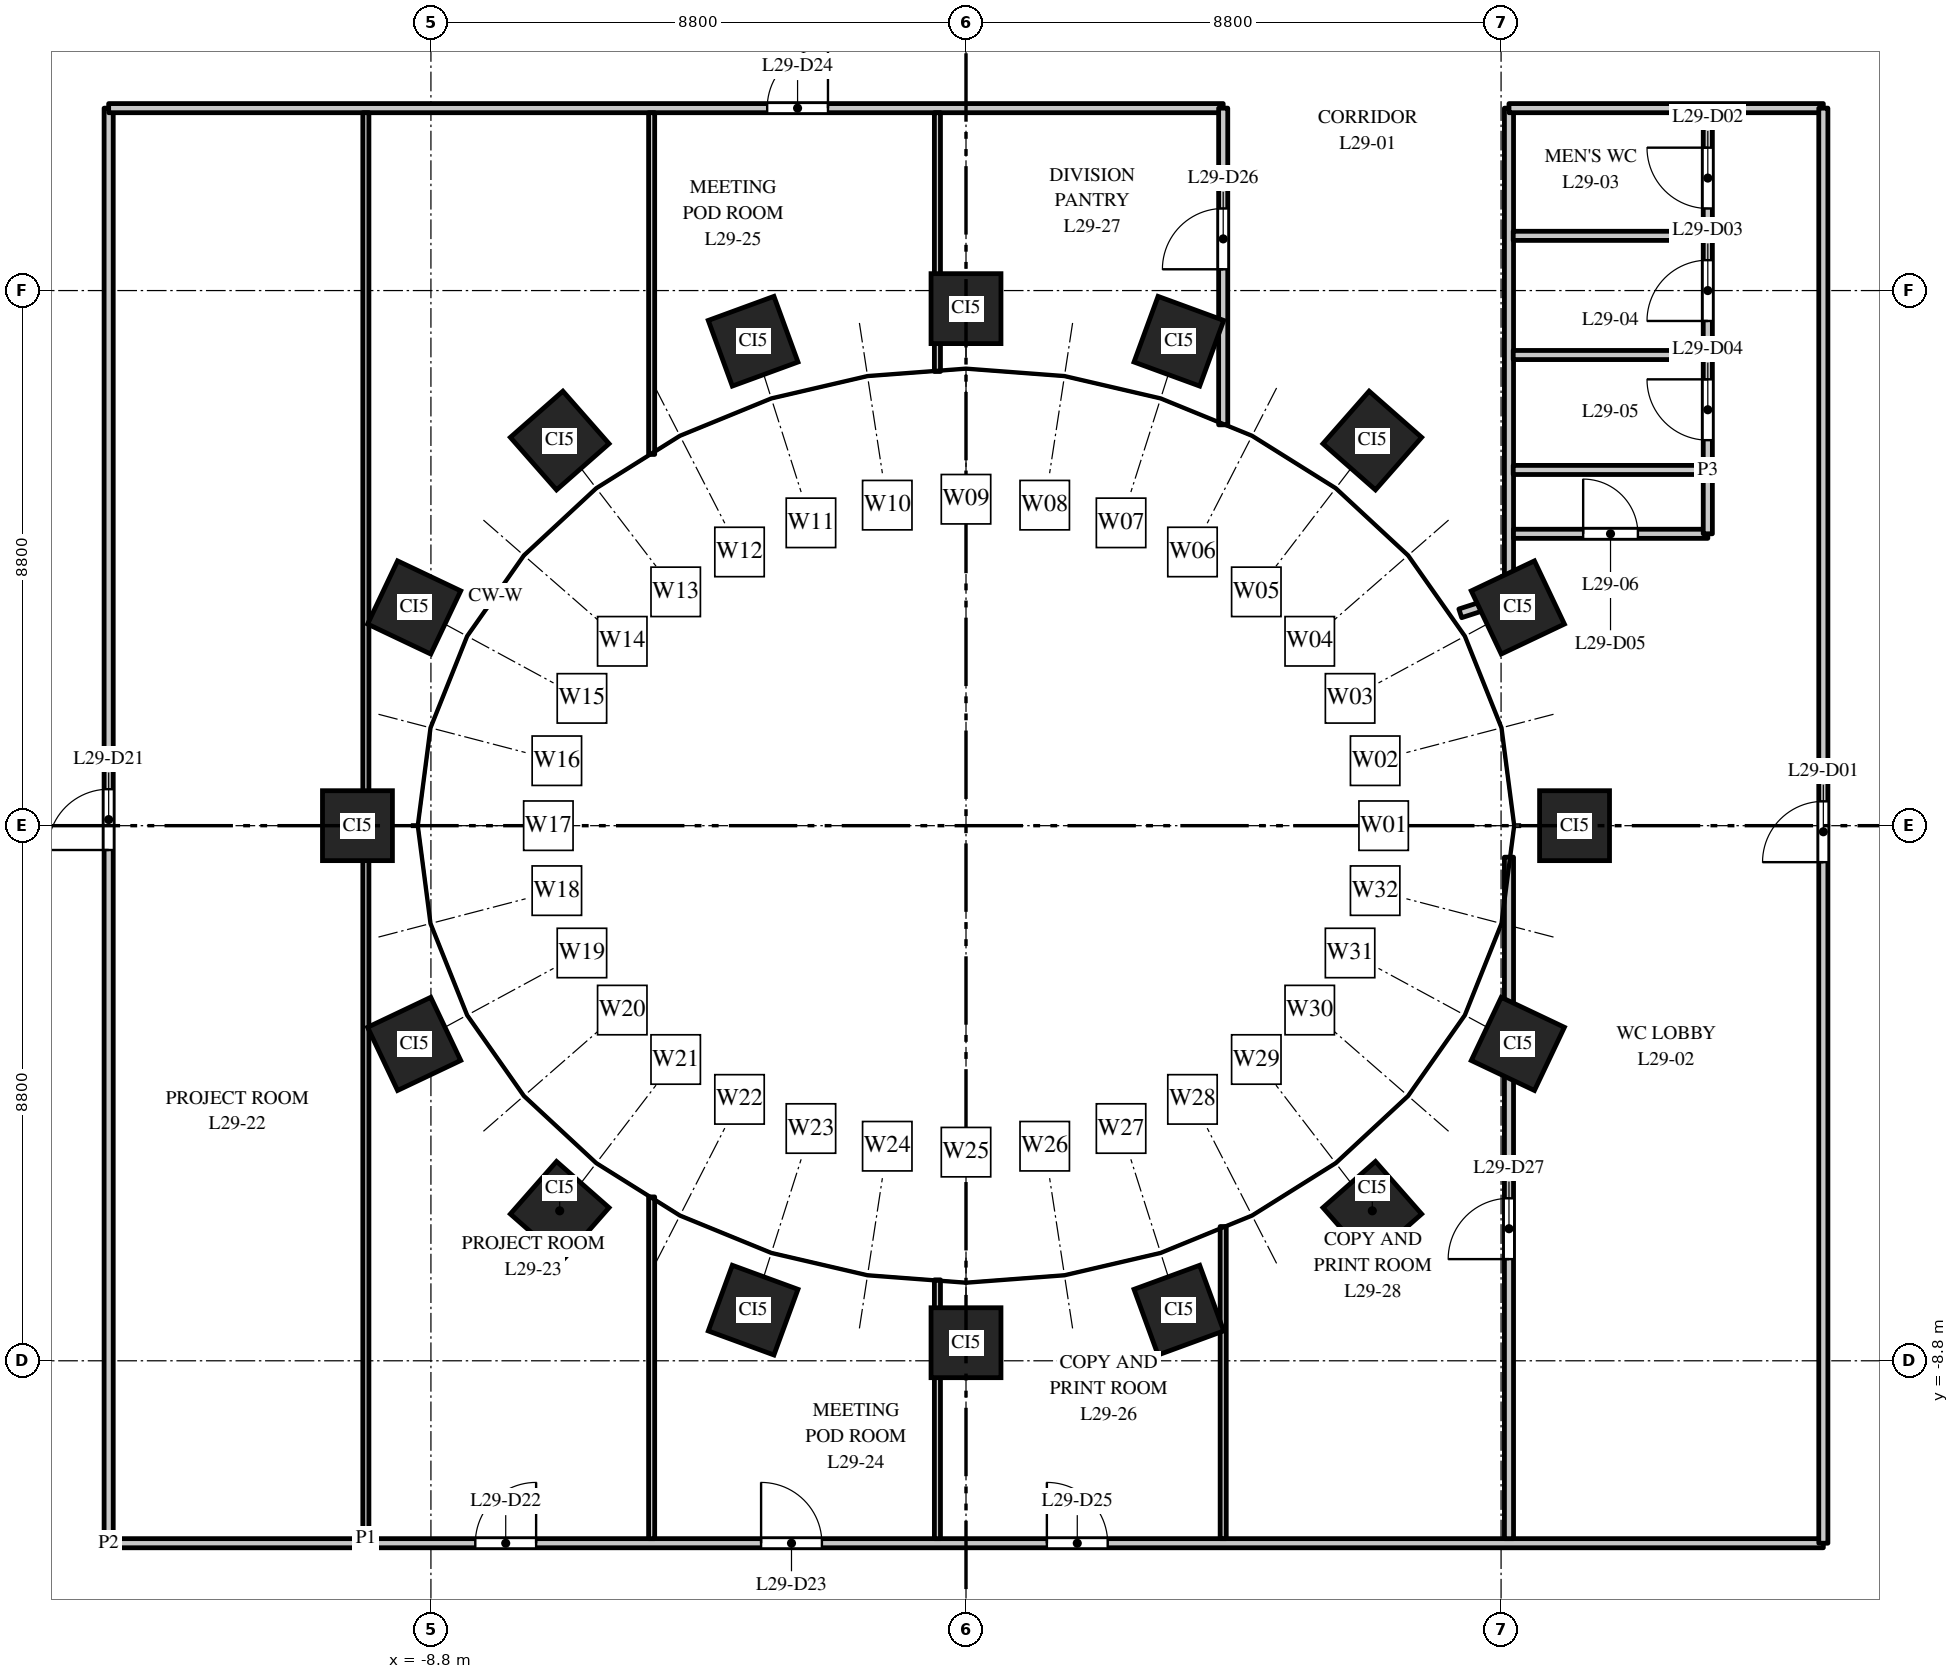
"""IFC4 building model, lengths in metres.
Left out: names, types, materials, properties, quantities, classifications, styles, units other than length and angle.
Written with IfcOpenShell. Run it as: python <this file> out.ifc"""

import sys

from ifc_helpers import new_model, si_unit, direction, frame, frame_2d, origin, origin_2d, place, context, subcontext, project, spatial, rectangle, extrude, element, fill, save


model = new_model("IFC4")
c1 = context("Model", 3, precision=1e-05, world=origin(), true_north=direction((0.0, 1.0)))
c2 = subcontext(c1, "Body", "Model", "MODEL_VIEW")
j1 = project(units=[si_unit("LENGTHUNIT", "METRE"), si_unit("PLANEANGLEUNIT", "RADIAN")], contexts=[c1])
p1 = place(None, origin())
s1 = spatial("IfcSite", under=j1, at=p1, CompositionType="ELEMENT")
p2 = place(p1, origin())
s2 = spatial("IfcBuilding", under=s1, at=p2, CompositionType="ELEMENT")
p3 = place(p2, frame((0.0, 0.0, 128.0)))
s3 = spatial("IfcBuildingStorey", under=s2, at=p3, CompositionType="ELEMENT", Elevation=128.0)
for number, where, z_axis, x_axis in (
    (1, (10.008, 0.0, 0.0), (0.0, 0.0, 1.0), (0.0, 1.0, 0.0)),
    (2, (9.076, 3.588, 0.0), (0.0, 0.0, 1.0), (-0.429, 0.903, 0.0)),
    (3, (6.682, 6.334, 0.0), (0.0, 0.0, 1.0), (-0.751, 0.66, 0.0)),
    (4, (3.501, 7.967, 0.0), (0.0, 0.0, 1.0), (-0.939, 0.344, 0.0)),
    (5, (0.0, 8.503, 0.0), (0.0, 0.0, 1.0), (-1.0, 0.0, 0.0)),
    (6, (-3.501, 7.967, 0.0), (0.0, 0.0, 1.0), (-0.939, -0.344, 0.0)),
    (7, (-6.682, 6.334, 0.0), (0.0, 0.0, 1.0), (-0.751, -0.66, 0.0)),
    (8, (-9.076, 3.588, 0.0), (0.0, 0.0, 1.0), (-0.429, -0.903, 0.0)),
    (9, (-10.008, 0.0, 0.0), (0.0, 0.0, 1.0), (0.0, -1.0, 0.0)),
    (10, (-9.076, -3.588, 0.0), (0.0, 0.0, 1.0), (0.429, -0.903, 0.0)),
    (11, (-6.682, -6.334, 0.0), (0.0, 0.0, 1.0), (0.751, -0.66, 0.0)),
    (12, (-3.501, -7.967, 0.0), (0.0, 0.0, 1.0), (0.939, -0.344, 0.0)),
    (13, (0.0, -8.503, 0.0), (0.0, 0.0, 1.0), (1.0, 0.0, 0.0)),
    (14, (3.501, -7.967, 0.0), (0.0, 0.0, 1.0), (0.939, 0.344, 0.0)),
    (15, (6.682, -6.334, 0.0), (0.0, 0.0, 1.0), (0.751, 0.66, 0.0)),
    (16, (9.076, -3.588, 0.0), (0.0, 0.0, 1.0), (0.429, 0.903, 0.0)),
):
    element("IfcColumn", number, at=place(p3, frame(where, z_axis=z_axis, x_axis=x_axis)), inside=s3, PredefinedType="COLUMN", context=c2, shape_type="SweptSolid", body=[
        extrude(rectangle(XDim=1.15, YDim=1.15, at=origin_2d()), origin(), (0.0, 0.0, 1.0), 4.0),
    ])
p4 = place(p3, frame((-14.1, -11.8, 0.0), z_axis=(0.0, 0.0, 1.0), x_axis=(0.0, 1.0, 0.0)))
e17 = element("IfcWall", 17, at=p4, inside=s3, PredefinedType="PARTITIONING", context=c2, shape_type="SweptSolid", body=[
    extrude(rectangle(XDim=23.6, YDim=0.15, at=frame_2d((11.8, 0.0))), origin(), (0.0, 0.0, 1.0), 2.75),
])
p5 = place(p4, frame((11.4, 0.0, 0.0)))
e18 = element("IfcOpeningElement", 18, at=p5, cuts=e17, PredefinedType="OPENING", context=c2, shape_type="SweptSolid", body=[
    extrude(rectangle(XDim=1.0, YDim=2.1, at=frame_2d((0.5, 1.05))), frame((0.0, 0.085, 0.0), z_axis=(0.0, -1.0, 0.0), x_axis=(1.0, 0.0, 0.0)), (0.0, 0.0, 1.0), 0.17),
])
p6 = place(p3, frame((-14.1, -11.8, 0.0), z_axis=(0.0, 0.0, 1.0), x_axis=(1.0, 0.0, 0.0)))
e19 = element("IfcWall", 19, at=p6, inside=s3, PredefinedType="PARTITIONING", context=c2, shape_type="SweptSolid", body=[
    extrude(rectangle(XDim=28.2, YDim=0.15, at=frame_2d((14.1, 0.0))), origin(), (0.0, 0.0, 1.0), 2.85),
])
p7 = place(p6, frame((6.03, 0.0, 0.0)))
e20 = element("IfcOpeningElement", 20, at=p7, cuts=e19, PredefinedType="OPENING", context=c2, shape_type="SweptSolid", body=[
    extrude(rectangle(XDim=1.0, YDim=2.1, at=frame_2d((0.5, 1.05))), frame((0.0, 0.085, 0.0), z_axis=(0.0, -1.0, 0.0), x_axis=(1.0, 0.0, 0.0)), (0.0, 0.0, 1.0), 0.17),
])
p8 = place(p6, frame((10.73, 0.0, 0.0)))
e21 = element("IfcOpeningElement", 21, at=p8, cuts=e19, PredefinedType="OPENING", context=c2, shape_type="SweptSolid", body=[
    extrude(rectangle(XDim=1.0, YDim=2.1, at=frame_2d((0.5, 1.05))), frame((0.0, 0.085, 0.0), z_axis=(0.0, -1.0, 0.0), x_axis=(1.0, 0.0, 0.0)), (0.0, 0.0, 1.0), 0.17),
])
p9 = place(p6, frame((15.43, 0.0, 0.0)))
e22 = element("IfcOpeningElement", 22, at=p9, cuts=e19, PredefinedType="OPENING", context=c2, shape_type="SweptSolid", body=[
    extrude(rectangle(XDim=1.0, YDim=2.1, at=frame_2d((0.5, 1.05))), frame((0.0, 0.085, 0.0), z_axis=(0.0, -1.0, 0.0), x_axis=(1.0, 0.0, 0.0)), (0.0, 0.0, 1.0), 0.17),
])
p10 = place(p3, frame((-14.1, 11.8, 0.0), z_axis=(0.0, 0.0, 1.0), x_axis=(1.0, 0.0, 0.0)))
e23 = element("IfcWall", 23, at=p10, inside=s3, PredefinedType="PARTITIONING", context=c2, shape_type="SweptSolid", body=[
    extrude(rectangle(XDim=18.33, YDim=0.15, at=frame_2d((9.165, 0.0))), origin(), (0.0, 0.0, 1.0), 2.85),
])
p11 = place(p10, frame((10.83, 0.0, 0.0)))
e24 = element("IfcOpeningElement", 24, at=p11, cuts=e23, PredefinedType="OPENING", context=c2, shape_type="SweptSolid", body=[
    extrude(rectangle(XDim=1.0, YDim=2.1, at=frame_2d((0.5, 1.05))), frame((0.0, 0.085, 0.0), z_axis=(0.0, -1.0, 0.0), x_axis=(1.0, 0.0, 0.0)), (0.0, 0.0, 1.0), 0.17),
])
p12 = place(p3, frame((-9.87, -11.725, 0.0), z_axis=(0.0, 0.0, 1.0), x_axis=(0.0, 1.0, 0.0)))
e25 = element("IfcWall", 25, at=p12, inside=s3, PredefinedType="PARTITIONING", context=c2, shape_type="SweptSolid", body=[
    extrude(rectangle(XDim=23.45, YDim=0.1, at=frame_2d((11.725, 0.0))), origin(), (0.0, 0.0, 1.0), 2.75),
])
for number, where, z_axis, x_axis in (
    (26, (-5.17, -11.725, 0.0), (0.0, 0.0, 1.0), (0.0, 1.0, 0.0)),
    (27, (-5.17, 6.105, 0.0), (0.0, 0.0, 1.0), (0.0, 1.0, 0.0)),
):
    element("IfcWall", number, at=place(p3, frame(where, z_axis=z_axis, x_axis=x_axis)), inside=s3, PredefinedType="PARTITIONING", context=c2, shape_type="SweptSolid", body=[
        extrude(rectangle(XDim=5.62, YDim=0.1, at=frame_2d((2.81, 0.0))), origin(), (0.0, 0.0, 1.0), 2.9),
    ])
for number, where, z_axis, x_axis in (
    (28, (-0.47, -11.725, 0.0), (0.0, 0.0, 1.0), (0.0, 1.0, 0.0)),
    (29, (-0.47, 7.469, 0.0), (0.0, 0.0, 1.0), (0.0, 1.0, 0.0)),
):
    element("IfcWall", number, at=place(p3, frame(where, z_axis=z_axis, x_axis=x_axis)), inside=s3, PredefinedType="PARTITIONING", context=c2, shape_type="SweptSolid", body=[
        extrude(rectangle(XDim=4.256, YDim=0.1, at=frame_2d((2.128, 0.0))), origin(), (0.0, 0.0, 1.0), 2.9),
    ])
p13 = place(p3, frame((4.23, -11.725, 0.0), z_axis=(0.0, 0.0, 1.0), x_axis=(0.0, 1.0, 0.0)))
e30 = element("IfcWall", 30, at=p13, inside=s3, PredefinedType="PARTITIONING", context=c2, shape_type="SweptSolid", body=[
    extrude(rectangle(XDim=5.133, YDim=0.1, at=frame_2d((2.566, 0.0))), origin(), (0.0, 0.0, 1.0), 2.9),
])
p14 = place(p3, frame((4.23, 6.592, 0.0), z_axis=(0.0, 0.0, 1.0), x_axis=(0.0, 1.0, 0.0)))
e31 = element("IfcWall", 31, at=p14, inside=s3, PredefinedType="PARTITIONING", context=c2, shape_type="SweptSolid", body=[
    extrude(rectangle(XDim=5.208, YDim=0.15, at=frame_2d((2.604, 0.0))), origin(), (0.0, 0.0, 1.0), 2.9),
])
p15 = place(p14, frame((2.558, 0.0, 0.0)))
e32 = element("IfcOpeningElement", 32, at=p15, cuts=e31, PredefinedType="OPENING", context=c2, shape_type="SweptSolid", body=[
    extrude(rectangle(XDim=1.0, YDim=2.1, at=frame_2d((0.5, 1.05))), frame((0.0, 0.085, 0.0), z_axis=(0.0, -1.0, 0.0), x_axis=(1.0, 0.0, 0.0)), (0.0, 0.0, 1.0), 0.17),
])
p16 = place(p3, frame((8.93, -11.725, 0.0), z_axis=(0.0, 0.0, 1.0), x_axis=(0.0, 1.0, 0.0)))
e33 = element("IfcWall", 33, at=p16, inside=s3, PredefinedType="PARTITIONING", context=c2, shape_type="SweptSolid", body=[
    extrude(rectangle(XDim=11.207, YDim=0.15, at=frame_2d((5.604, 0.0))), origin(), (0.0, 0.0, 1.0), 2.75),
])
p17 = place(p16, frame((4.597, 0.0, 0.0)))
e34 = element("IfcOpeningElement", 34, at=p17, cuts=e33, PredefinedType="OPENING", context=c2, shape_type="SweptSolid", body=[
    extrude(rectangle(XDim=1.0, YDim=2.1, at=frame_2d((0.5, 1.05))), frame((0.0, 0.085, 0.0), z_axis=(0.0, -1.0, 0.0), x_axis=(1.0, 0.0, 0.0)), (0.0, 0.0, 1.0), 0.17),
])
p18 = place(p3, frame((8.93, 3.879, 0.0), z_axis=(0.0, 0.0, 1.0), x_axis=(0.0, 1.0, 0.0)))
e35 = element("IfcWall", 35, at=p18, inside=s3, PredefinedType="PARTITIONING", context=c2, shape_type="SweptSolid", body=[
    extrude(rectangle(XDim=7.921, YDim=0.15, at=frame_2d((3.96, 0.0))), origin(), (0.0, 0.0, 1.0), 2.75),
])
p19 = place(p3, frame((8.93, 11.8, 0.0), z_axis=(0.0, 0.0, 1.0), x_axis=(1.0, 0.0, 0.0)))
e36 = element("IfcWall", 36, at=p19, inside=s3, PredefinedType="PARTITIONING", context=c2, shape_type="SweptSolid", body=[
    extrude(rectangle(XDim=5.17, YDim=0.15, at=frame_2d((2.585, 0.0))), origin(), (0.0, 0.0, 1.0), 3.7),
])
p20 = place(p3, frame((9.0, 5.85, 0.0), z_axis=(0.0, 0.0, 1.0), x_axis=(1.0, 0.0, 0.0)))
e37 = element("IfcWall", 37, at=p20, inside=s3, PredefinedType="PARTITIONING", context=c2, shape_type="SweptSolid", body=[
    extrude(rectangle(XDim=3.2, YDim=0.15, at=frame_2d((1.6, 0.0))), origin(), (0.0, 0.0, 1.0), 2.75),
])
for number, where, z_axis, x_axis in (
    (38, (9.0, 7.74, 0.0), (0.0, 0.0, 1.0), (1.0, 0.0, 0.0)),
    (39, (9.0, 9.7, 0.0), (0.0, 0.0, 1.0), (1.0, 0.0, 0.0)),
):
    element("IfcWall", number, at=place(p3, frame(where, z_axis=z_axis, x_axis=x_axis)), inside=s3, PredefinedType="PARTITIONING", context=c2, shape_type="SweptSolid", body=[
        extrude(rectangle(XDim=3.125, YDim=0.15, at=frame_2d((1.562, 0.0))), origin(), (0.0, 0.0, 1.0), 3.7),
    ])
p21 = place(p3, frame((9.004, 4.8, 0.0), z_axis=(0.0, 0.0, 1.0), x_axis=(1.0, 0.0, 0.0)))
e40 = element("IfcWall", 40, at=p21, inside=s3, PredefinedType="PARTITIONING", context=c2, shape_type="SweptSolid", body=[
    extrude(rectangle(XDim=3.196, YDim=0.15, at=frame_2d((1.598, 0.0))), origin(), (0.0, 0.0, 1.0), 2.75),
])
p22 = place(p21, frame((1.146, 0.0, 0.0)))
e41 = element("IfcOpeningElement", 41, at=p22, cuts=e40, PredefinedType="OPENING", context=c2, shape_type="SweptSolid", body=[
    extrude(rectangle(XDim=0.9, YDim=2.1, at=frame_2d((0.45, 1.05))), frame((0.0, 0.085, 0.0), z_axis=(0.0, -1.0, 0.0), x_axis=(1.0, 0.0, 0.0)), (0.0, 0.0, 1.0), 0.17),
])
p23 = place(p3, frame((12.2, 4.8, 0.0), z_axis=(0.0, 0.0, 1.0), x_axis=(0.0, 1.0, 0.0)))
e42 = element("IfcWall", 42, at=p23, inside=s3, PredefinedType="PARTITIONING", context=c2, shape_type="SweptSolid", body=[
    extrude(rectangle(XDim=1.05, YDim=0.15, at=frame_2d((0.525, 0.0))), origin(), (0.0, 0.0, 1.0), 3.7),
])
p24 = place(p3, frame((12.2, 5.85, 0.0), z_axis=(0.0, 0.0, 1.0), x_axis=(0.0, 1.0, 0.0)))
e43 = element("IfcWall", 43, at=p24, inside=s3, PredefinedType="PARTITIONING", context=c2, shape_type="SweptSolid", body=[
    extrude(rectangle(XDim=5.875, YDim=0.15, at=frame_2d((2.938, 0.0))), origin(), (0.0, 0.0, 1.0), 2.75),
])
p25 = place(p24, frame((4.3, 0.0, 0.0)))
e44 = element("IfcOpeningElement", 44, at=p25, cuts=e43, PredefinedType="OPENING", context=c2, shape_type="SweptSolid", body=[
    extrude(rectangle(XDim=1.0, YDim=2.1, at=frame_2d((0.5, 1.05))), frame((0.0, 0.085, 0.0), z_axis=(0.0, -1.0, 0.0), x_axis=(1.0, 0.0, 0.0)), (0.0, 0.0, 1.0), 0.17),
])
p26 = place(p24, frame((2.45, 0.0, 0.0)))
e45 = element("IfcOpeningElement", 45, at=p26, cuts=e43, PredefinedType="OPENING", context=c2, shape_type="SweptSolid", body=[
    extrude(rectangle(XDim=1.0, YDim=2.1, at=frame_2d((0.5, 1.05))), frame((0.0, 0.085, 0.0), z_axis=(0.0, -1.0, 0.0), x_axis=(1.0, 0.0, 0.0)), (0.0, 0.0, 1.0), 0.17),
])
p27 = place(p24, frame((0.49, 0.0, 0.0)))
e46 = element("IfcOpeningElement", 46, at=p27, cuts=e43, PredefinedType="OPENING", context=c2, shape_type="SweptSolid", body=[
    extrude(rectangle(XDim=1.0, YDim=2.1, at=frame_2d((0.5, 1.05))), frame((0.0, 0.085, 0.0), z_axis=(0.0, -1.0, 0.0), x_axis=(1.0, 0.0, 0.0)), (0.0, 0.0, 1.0), 0.17),
])
p28 = place(p3, frame((14.1, -11.8, 0.0), z_axis=(0.0, 0.0, 1.0), x_axis=(0.0, 1.0, 0.0)))
e47 = element("IfcWall", 47, at=p28, inside=s3, PredefinedType="PARTITIONING", context=c2, shape_type="SweptSolid", body=[
    extrude(rectangle(XDim=23.6, YDim=0.15, at=frame_2d((11.8, 0.0))), origin(), (0.0, 0.0, 1.0), 2.75),
])
p29 = place(p28, frame((11.2, 0.0, 0.0)))
e48 = element("IfcOpeningElement", 48, at=p29, cuts=e47, PredefinedType="OPENING", context=c2, shape_type="SweptSolid", body=[
    extrude(rectangle(XDim=1.0, YDim=2.1, at=frame_2d((0.5, 1.05))), frame((0.0, 0.085, 0.0), z_axis=(0.0, -1.0, 0.0), x_axis=(1.0, 0.0, 0.0)), (0.0, 0.0, 1.0), 0.17),
])
p30 = place(p3, frame((8.884, 3.736, 0.0), z_axis=(0.0, 0.0, 1.0), x_axis=(-0.951505448118, -0.307631893992, 0.0)))
e49 = element("IfcWall", 49, at=p30, inside=s3, PredefinedType="PARTITIONING", context=c2, shape_type="SweptSolid", body=[
    extrude(rectangle(XDim=0.794, YDim=0.15, at=frame_2d((0.397, 0.0))), origin(), (0.0, 0.0, 1.0), 2.9),
])
p31 = place(p29, origin())
e50 = element("IfcDoor", 50, at=p31, inside=s3, OperationType="SINGLE_SWING_LEFT", PredefinedType="DOOR", context=c2, shape_type="SweptSolid", body=[
    extrude(rectangle(XDim=1.0, YDim=2.1, at=frame_2d((0.5, 1.05))), frame((0.0, 0.025, 0.0), z_axis=(0.0, -1.0, 0.0), x_axis=(1.0, 0.0, 0.0)), (0.0, 0.0, 1.0), 0.05),
])
fill(e48, e50)
p32 = place(p25, origin())
e51 = element("IfcDoor", 51, at=p32, inside=s3, OperationType="SINGLE_SWING_RIGHT", PredefinedType="DOOR", context=c2, shape_type="SweptSolid", body=[
    extrude(rectangle(XDim=1.0, YDim=2.1, at=frame_2d((0.5, 1.05))), frame((0.0, 0.025, 0.0), z_axis=(0.0, -1.0, 0.0), x_axis=(1.0, 0.0, 0.0)), (0.0, 0.0, 1.0), 0.05),
])
fill(e44, e51)
p33 = place(p26, origin())
e52 = element("IfcDoor", 52, at=p33, inside=s3, OperationType="SINGLE_SWING_LEFT", PredefinedType="DOOR", context=c2, shape_type="SweptSolid", body=[
    extrude(rectangle(XDim=1.0, YDim=2.1, at=frame_2d((0.5, 1.05))), frame((0.0, 0.025, 0.0), z_axis=(0.0, -1.0, 0.0), x_axis=(1.0, 0.0, 0.0)), (0.0, 0.0, 1.0), 0.05),
])
fill(e45, e52)
p34 = place(p27, origin())
e53 = element("IfcDoor", 53, at=p34, inside=s3, OperationType="SINGLE_SWING_RIGHT", PredefinedType="DOOR", context=c2, shape_type="SweptSolid", body=[
    extrude(rectangle(XDim=1.0, YDim=2.1, at=frame_2d((0.5, 1.05))), frame((0.0, 0.025, 0.0), z_axis=(0.0, -1.0, 0.0), x_axis=(1.0, 0.0, 0.0)), (0.0, 0.0, 1.0), 0.05),
])
fill(e46, e53)
p35 = place(p22, origin())
e54 = element("IfcDoor", 54, at=p35, inside=s3, OperationType="SINGLE_SWING_LEFT", PredefinedType="DOOR", context=c2, shape_type="SweptSolid", body=[
    extrude(rectangle(XDim=0.9, YDim=2.1, at=frame_2d((0.45, 1.05))), frame((0.0, 0.025, 0.0), z_axis=(0.0, -1.0, 0.0), x_axis=(1.0, 0.0, 0.0)), (0.0, 0.0, 1.0), 0.05),
])
fill(e41, e54)
p36 = place(p5, origin())
e55 = element("IfcDoor", 55, at=p36, inside=s3, OperationType="SINGLE_SWING_LEFT", PredefinedType="DOOR", context=c2, shape_type="SweptSolid", body=[
    extrude(rectangle(XDim=1.0, YDim=2.1, at=frame_2d((0.5, 1.05))), frame((0.0, 0.025, 0.0), z_axis=(0.0, -1.0, 0.0), x_axis=(1.0, 0.0, 0.0)), (0.0, 0.0, 1.0), 0.05),
])
fill(e18, e55)
p37 = place(p7, origin())
e56 = element("IfcDoor", 56, at=p37, inside=s3, OperationType="SINGLE_SWING_RIGHT", PredefinedType="DOOR", context=c2, shape_type="SweptSolid", body=[
    extrude(rectangle(XDim=1.0, YDim=2.1, at=frame_2d((0.5, 1.05))), frame((0.0, 0.025, 0.0), z_axis=(0.0, -1.0, 0.0), x_axis=(1.0, 0.0, 0.0)), (0.0, 0.0, 1.0), 0.05),
])
fill(e20, e56)
p38 = place(p8, origin())
e57 = element("IfcDoor", 57, at=p38, inside=s3, OperationType="SINGLE_SWING_LEFT", PredefinedType="DOOR", context=c2, shape_type="SweptSolid", body=[
    extrude(rectangle(XDim=1.0, YDim=2.1, at=frame_2d((0.5, 1.05))), frame((0.0, 0.025, 0.0), z_axis=(0.0, -1.0, 0.0), x_axis=(1.0, 0.0, 0.0)), (0.0, 0.0, 1.0), 0.05),
])
fill(e21, e57)
p39 = place(p11, origin())
e58 = element("IfcDoor", 58, at=p39, inside=s3, OperationType="SINGLE_SWING_RIGHT", PredefinedType="DOOR", context=c2, shape_type="SweptSolid", body=[
    extrude(rectangle(XDim=1.0, YDim=2.1, at=frame_2d((0.5, 1.05))), frame((0.0, 0.025, 0.0), z_axis=(0.0, -1.0, 0.0), x_axis=(1.0, 0.0, 0.0)), (0.0, 0.0, 1.0), 0.05),
])
fill(e24, e58)
p40 = place(p9, origin())
e59 = element("IfcDoor", 59, at=p40, inside=s3, OperationType="SINGLE_SWING_LEFT", PredefinedType="DOOR", context=c2, shape_type="SweptSolid", body=[
    extrude(rectangle(XDim=1.0, YDim=2.1, at=frame_2d((0.5, 1.05))), frame((0.0, 0.025, 0.0), z_axis=(0.0, -1.0, 0.0), x_axis=(1.0, 0.0, 0.0)), (0.0, 0.0, 1.0), 0.05),
])
fill(e22, e59)
p41 = place(p15, origin())
e60 = element("IfcDoor", 60, at=p41, inside=s3, OperationType="SINGLE_SWING_LEFT", PredefinedType="DOOR", context=c2, shape_type="SweptSolid", body=[
    extrude(rectangle(XDim=1.0, YDim=2.1, at=frame_2d((0.5, 1.05))), frame((0.0, 0.025, 0.0), z_axis=(0.0, -1.0, 0.0), x_axis=(1.0, 0.0, 0.0)), (0.0, 0.0, 1.0), 0.05),
])
fill(e32, e60)
p42 = place(p17, origin())
e61 = element("IfcDoor", 61, at=p42, inside=s3, OperationType="SINGLE_SWING_LEFT", PredefinedType="DOOR", context=c2, shape_type="SweptSolid", body=[
    extrude(rectangle(XDim=1.0, YDim=2.1, at=frame_2d((0.5, 1.05))), frame((0.0, 0.025, 0.0), z_axis=(0.0, -1.0, 0.0), x_axis=(1.0, 0.0, 0.0)), (0.0, 0.0, 1.0), 0.05),
])
fill(e34, e61)
save(model, sys.argv[1])
